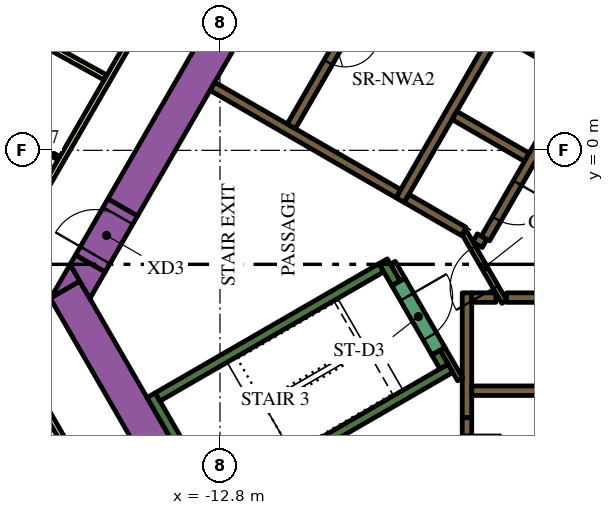
"""IFC4 building model, lengths in metres.
Left out: names, types, materials, properties, quantities, classifications, styles, units other than length and angle.
Written with IfcOpenShell. Run it as: python <this file> out.ifc"""

import sys

from ifc_helpers import new_model, si_unit, direction, frame, frame_2d, origin, place, context, subcontext, project, spatial, polyline, rectangle, outline, extrude, element, fill, save


model = new_model("IFC4")
c1 = context("Model", 3, precision=1e-05, world=origin(), true_north=direction((0.0, 1.0)))
c2 = subcontext(c1, "Body", "Model", "MODEL_VIEW")
j1 = project(units=[si_unit("LENGTHUNIT", "METRE"), si_unit("PLANEANGLEUNIT", "RADIAN")], contexts=[c1])
p1 = place(None, origin())
s1 = spatial("IfcSite", under=j1, at=p1, CompositionType="ELEMENT")
p2 = place(p1, origin())
s2 = spatial("IfcBuilding", under=s1, at=p2, CompositionType="ELEMENT")
p3 = place(p2, frame((0.0, 0.0, 74.4)))
s3 = spatial("IfcBuildingStorey", under=s2, at=p3, CompositionType="ELEMENT", Elevation=74.4)
p4 = place(p3, frame((-15.36, -1.503, 0.0), z_axis=(0.0, 0.0, 1.0), x_axis=(0.50000389221, 0.866023156604, 0.0)))
e1 = element("IfcWall", 1, at=p4, inside=s3, PredefinedType="SOLIDWALL", context=c2, shape_type="SweptSolid", body=[
    extrude(rectangle(XDim=21.0, YDim=0.9, at=frame_2d((10.5, 0.0))), origin(), (0.0, 0.0, 1.0), 3.9),
])
p5 = place(p3, frame((-12.134, -11.883, 0.0), z_axis=(0.0, 0.0, 1.0), x_axis=(-0.500005339912, 0.866022320763, 0.0)))
e2 = element("IfcWall", 2, at=p5, inside=s3, PredefinedType="SOLIDWALL", context=c2, shape_type="SweptSolid", body=[
    extrude(rectangle(XDim=9.488, YDim=0.9, at=frame_2d((4.744, 0.0))), origin(), (0.0, 0.0, 1.0), 3.9),
])
p6 = place(p3, origin())
e3 = element("IfcWall", 3, at=p6, inside=s3, PredefinedType="SOLIDWALL", context=c2, shape_type="SweptSolid", body=[
    extrude(outline(polyline([(-16.489, -3.44), (-17.251, -3.88), (-16.743, -3.0), (-16.489, -3.44)])), origin(), (0.0, 0.0, 1.0), 3.9),
])
e4 = element("IfcWall", 4, at=p6, inside=s3, PredefinedType="SOLIDWALL", context=c2, shape_type="SweptSolid", body=[
    extrude(outline(polyline([(-15.82, -3.201), (-16.223, -3.9), (-16.743, -3.0), (-16.599, -2.751), (-15.82, -3.201)])), origin(), (0.0, 0.0, 1.0), 3.9),
])
p7 = place(p3, frame((-12.885, -9.431, 0.0), z_axis=(0.0, 0.0, 1.0), x_axis=(-0.500020560727, 0.866013532718, 0.0)))
e5 = element("IfcWall", 5, at=p7, inside=s3, PredefinedType="SOLIDWALL", context=c2, shape_type="SweptSolid", body=[
    extrude(rectangle(XDim=3.45, YDim=0.25, at=frame_2d((1.725, 0.0))), origin(), (0.0, 0.0, 1.0), 3.9),
])
p8 = place(p3, frame((-14.44, -6.49, 0.0), z_axis=(0.0, 0.0, 1.0), x_axis=(0.866022966069, 0.500004222222, 0.0)))
e6 = element("IfcWall", 6, at=p8, inside=s3, PredefinedType="SOLIDWALL", context=c2, shape_type="SweptSolid", body=[
    extrude(rectangle(XDim=6.8, YDim=0.25, at=frame_2d((3.4, 0.0))), origin(), (0.0, 0.0, 1.0), 3.9),
])
p9 = place(p3, frame((-8.168, -3.503, 0.0), z_axis=(0.0, 0.0, 1.0), x_axis=(-0.499952099219, 0.866053057547, 0.0)))
e7 = element("IfcWall", 7, at=p9, inside=s3, PredefinedType="SOLIDWALL", context=c2, shape_type="SweptSolid", body=[
    extrude(rectangle(XDim=0.675, YDim=0.25, at=frame_2d((0.337, 0.0))), origin(), (0.0, 0.0, 1.0), 3.9),
])
p10 = place(p3, frame((-12.84, -9.261, 0.0), z_axis=(0.0, 0.0, 1.0), x_axis=(0.866016039709, 0.500016218704, 0.0)))
e8 = element("IfcWall", 8, at=p10, inside=s3, PredefinedType="SOLIDWALL", context=c2, shape_type="SweptSolid", body=[
    extrude(rectangle(XDim=7.05, YDim=0.25, at=frame_2d((3.525, 0.0))), origin(), (0.0, 0.0, 1.0), 3.9),
])
p11 = place(p3, frame((-6.905, -5.69, 0.0), z_axis=(0.0, 0.0, 1.0), x_axis=(-0.500402024738, 0.865793170242, 0.0)))
e9 = element("IfcWall", 9, at=p11, inside=s3, PredefinedType="SOLIDWALL", context=c2, shape_type="SweptSolid", body=[
    extrude(rectangle(XDim=0.425, YDim=0.25, at=frame_2d((0.212, 0.0))), origin(), (0.0, 0.0, 1.0), 3.9),
])
p12 = place(p3, frame((-5.259, -3.875, 0.0), z_axis=(0.0, 0.0, 1.0), x_axis=(1.0, 0.0, 0.0)))
e10 = element("IfcWall", 10, at=p12, inside=s3, PredefinedType="SOLIDWALL", context=c2, shape_type="SweptSolid", body=[
    extrude(rectangle(XDim=10.489, YDim=0.25, at=frame_2d((5.244, 0.0))), origin(), (0.0, 0.0, 1.0), 3.9),
])
p13 = place(p3, frame((-6.3, -7.035, 0.0), z_axis=(0.0, 0.0, 1.0), x_axis=(0.0, 1.0, 0.0)))
e11 = element("IfcWall", 11, at=p13, inside=s3, PredefinedType="SOLIDWALL", context=c2, shape_type="SweptSolid", body=[
    extrude(rectangle(XDim=3.285, YDim=0.25, at=frame_2d((1.643, 0.0))), origin(), (0.0, 0.0, 1.0), 3.9),
])
p14 = place(p3, frame((-6.175, -3.875, 0.0), z_axis=(0.0, 0.0, 1.0), x_axis=(1.0, 0.0, 0.0)))
e12 = element("IfcWall", 12, at=p14, inside=s3, PredefinedType="SOLIDWALL", context=c2, shape_type="SweptSolid", body=[
    extrude(rectangle(XDim=0.637, YDim=0.25, at=frame_2d((0.318, 0.0))), origin(), (0.0, 0.0, 1.0), 3.9),
])
p15 = place(p3, frame((-8.06, -1.311, 0.0), z_axis=(0.0, 0.0, 1.0), x_axis=(0.50000273126, 0.866023826885, 0.0)))
e13 = element("IfcWall", 13, at=p15, inside=s3, PredefinedType="SOLIDWALL", context=c2, shape_type="SweptSolid", body=[
    extrude(rectangle(XDim=10.33, YDim=0.25, at=frame_2d((5.165, 0.0))), origin(), (0.0, 0.0, 1.0), 3.9),
])
for number, where, z_axis, x_axis in (
    (14, (-5.369, 3.1, 0.0), (0.0, 0.0, 1.0), (0.866, -0.5, 0.0)),
    (15, (-4.724, -0.182, 0.0), (0.0, 0.0, 1.0), (-0.866, 0.5, 0.0)),
):
    element("IfcWall", number, at=place(p3, frame(where, z_axis=z_axis, x_axis=x_axis)), inside=s3, PredefinedType="SOLIDWALL", context=c2, shape_type="SweptSolid", body=[
        extrude(rectangle(XDim=2.2, YDim=0.25, at=frame_2d((1.1, 0.0))), origin(), (0.0, 0.0, 1.0), 3.9),
    ])
p16 = place(p3, frame((-6.088, -2.305, 0.0), z_axis=(0.0, 0.0, 1.0), x_axis=(0.866059450854, -0.499941024108, 0.0)))
e16 = element("IfcWall", 16, at=p16, inside=s3, PredefinedType="SOLIDWALL", context=c2, shape_type="SweptSolid", body=[
    extrude(rectangle(XDim=0.29, YDim=0.25, at=frame_2d((0.145, 0.0))), origin(), (0.0, 0.0, 1.0), 3.9),
])
p17 = place(p3, frame((-7.889, -1.265, 0.0), z_axis=(0.0, 0.0, 1.0), x_axis=(0.865986741702, -0.500066958712, 0.0)))
e17 = element("IfcWall", 17, at=p17, inside=s3, PredefinedType="SOLIDWALL", context=c2, shape_type="SweptSolid", body=[
    extrude(rectangle(XDim=1.738, YDim=0.25, at=frame_2d((0.869, 0.0))), origin(), (0.0, 0.0, 1.0), 3.9),
])
p18 = place(p3, frame((-8.106, -1.14, 0.0), z_axis=(0.0, 0.0, 1.0), x_axis=(-0.866000643155, 0.500042884217, 0.0)))
e18 = element("IfcWall", 18, at=p18, inside=s3, PredefinedType="SOLIDWALL", context=c2, shape_type="SweptSolid", body=[
    extrude(rectangle(XDim=5.65, YDim=0.25, at=frame_2d((2.825, 0.0))), origin(), (0.0, 0.0, 1.0), 3.9),
])
p19 = place(p3, frame((-6.48, -6.027, 0.0), z_axis=(0.0, 0.0, 1.0), x_axis=(-0.499927229454, 0.866067413802, 0.0)))
e19 = element("IfcWall", 19, at=p19, inside=s3, PredefinedType="PARTITIONING", context=c2, shape_type="SweptSolid", body=[
    extrude(rectangle(XDim=0.929, YDim=0.15, at=frame_2d((0.464, 0.0))), origin(), (0.0, 0.0, 1.0), 3.9),
])
p20 = place(p3, frame((-8.252, -2.958, 0.0), z_axis=(0.0, 0.0, 1.0), x_axis=(0.500174715838, -0.865924508047, 0.0)))
e20 = element("IfcWall", 20, at=p20, inside=s3, PredefinedType="PARTITIONING", context=c2, shape_type="SweptSolid", body=[
    extrude(rectangle(XDim=0.514, YDim=0.15, at=frame_2d((0.257, 0.0))), origin(), (0.0, 0.0, 1.0), 2.7),
])
p21 = place(p3, frame((-6.175, -6.325, 0.0), z_axis=(0.0, 0.0, 1.0), x_axis=(1.0, 0.0, 0.0)))
e21 = element("IfcWall", 21, at=p21, inside=s3, PredefinedType="SOLIDWALL", context=c2, shape_type="SweptSolid", body=[
    extrude(rectangle(XDim=12.35, YDim=0.25, at=frame_2d((6.175, 0.0))), origin(), (0.0, 0.0, 1.0), 3.9),
])
p22 = place(p21, frame((3.205, 0.0, 0.0)))
e22 = element("IfcOpeningElement", 22, at=p22, cuts=e21, PredefinedType="OPENING", context=c2, shape_type="SweptSolid", body=[
    extrude(rectangle(XDim=0.9, YDim=2.1, at=frame_2d((0.45, 1.05))), frame((0.0, 0.135, 0.0), z_axis=(0.0, -1.0, 0.0), x_axis=(1.0, 0.0, 0.0)), (0.0, 0.0, 1.0), 0.27),
])
p23 = place(p21, frame((8.145, 0.0, 0.0)))
e23 = element("IfcOpeningElement", 23, at=p23, cuts=e21, PredefinedType="OPENING", context=c2, shape_type="SweptSolid", body=[
    extrude(rectangle(XDim=1.1, YDim=2.1, at=frame_2d((0.55, 1.05))), frame((0.0, 0.135, 0.0), z_axis=(0.0, -1.0, 0.0), x_axis=(1.0, 0.0, 0.0)), (0.0, 0.0, 1.0), 0.27),
])
p24 = place(p21, frame((10.665, 0.0, 0.0)))
e24 = element("IfcOpeningElement", 24, at=p24, cuts=e21, PredefinedType="OPENING", context=c2, shape_type="SweptSolid", body=[
    extrude(rectangle(XDim=1.1, YDim=2.1, at=frame_2d((0.55, 1.05))), frame((0.0, 0.135, 0.0), z_axis=(0.0, -1.0, 0.0), x_axis=(1.0, 0.0, 0.0)), (0.0, 0.0, 1.0), 0.27),
])
p25 = place(p3, frame((-6.008, 9.144, 0.0), z_axis=(0.0, 0.0, 1.0), x_axis=(-0.500006956611, -0.866021387346, 0.0)))
e25 = element("IfcWall", 25, at=p25, inside=s3, PredefinedType="SOLIDWALL", context=c2, shape_type="SweptSolid", body=[
    extrude(rectangle(XDim=9.83, YDim=0.25, at=frame_2d((4.915, 0.0))), origin(), (0.0, 0.0, 1.0), 3.9),
])
p26 = place(p25, frame((6.985, 0.0, 0.0)))
e26 = element("IfcOpeningElement", 26, at=p26, cuts=e25, PredefinedType="OPENING", context=c2, shape_type="SweptSolid", body=[
    extrude(rectangle(XDim=0.9, YDim=2.1, at=frame_2d((0.45, 1.05))), frame((0.0, 0.135, 0.0), z_axis=(0.0, -1.0, 0.0), x_axis=(1.0, 0.0, 0.0)), (0.0, 0.0, 1.0), 0.27),
])
p27 = place(p3, frame((-0.898, 6.194, 0.0), z_axis=(0.0, 0.0, 1.0), x_axis=(-0.499996202215, -0.866027596426, 0.0)))
e27 = element("IfcWall", 27, at=p27, inside=s3, PredefinedType="SOLIDWALL", context=c2, shape_type="SweptSolid", body=[
    extrude(rectangle(XDim=9.83, YDim=0.25, at=frame_2d((4.915, 0.0))), origin(), (0.0, 0.0, 1.0), 3.9),
])
p28 = place(p27, frame((0.585, 0.0, 0.0)))
e28 = element("IfcOpeningElement", 28, at=p28, cuts=e27, PredefinedType="OPENING", context=c2, shape_type="SweptSolid", body=[
    extrude(rectangle(XDim=1.1, YDim=2.1, at=frame_2d((0.55, 1.05))), frame((0.0, 0.135, 0.0), z_axis=(0.0, -1.0, 0.0), x_axis=(1.0, 0.0, 0.0)), (0.0, 0.0, 1.0), 0.27),
])
p29 = place(p27, frame((3.105, 0.0, 0.0)))
e29 = element("IfcOpeningElement", 29, at=p29, cuts=e27, PredefinedType="OPENING", context=c2, shape_type="SweptSolid", body=[
    extrude(rectangle(XDim=1.1, YDim=2.1, at=frame_2d((0.55, 1.05))), frame((0.0, 0.135, 0.0), z_axis=(0.0, -1.0, 0.0), x_axis=(1.0, 0.0, 0.0)), (0.0, 0.0, 1.0), 0.27),
])
p30 = place(p27, frame((5.625, 0.0, 0.0)))
e30 = element("IfcOpeningElement", 30, at=p30, cuts=e27, PredefinedType="OPENING", context=c2, shape_type="SweptSolid", body=[
    extrude(rectangle(XDim=1.1, YDim=2.1, at=frame_2d((0.55, 1.05))), frame((0.0, 0.135, 0.0), z_axis=(0.0, -1.0, 0.0), x_axis=(1.0, 0.0, 0.0)), (0.0, 0.0, 1.0), 0.27),
])
p31 = place(p27, frame((8.145, 0.0, 0.0)))
e31 = element("IfcOpeningElement", 31, at=p31, cuts=e27, PredefinedType="OPENING", context=c2, shape_type="SweptSolid", body=[
    extrude(rectangle(XDim=1.1, YDim=2.1, at=frame_2d((0.55, 1.05))), frame((0.0, 0.135, 0.0), z_axis=(0.0, -1.0, 0.0), x_axis=(1.0, 0.0, 0.0)), (0.0, 0.0, 1.0), 0.27),
])
p32 = place(p3, frame((-8.103, -3.466, 0.0), z_axis=(0.0, 0.0, 1.0), x_axis=(0.500078061341, -0.865980330357, 0.0)))
e32 = element("IfcWall", 32, at=p32, inside=s3, PredefinedType="SOLIDWALL", context=c2, shape_type="SweptSolid", body=[
    extrude(rectangle(XDim=2.1, YDim=0.4, at=frame_2d((1.05, 0.0))), origin(), (0.0, 0.0, 1.0), 3.9),
])
p33 = place(p32, frame((0.45, 0.0, 0.0)))
e33 = element("IfcOpeningElement", 33, at=p33, cuts=e32, PredefinedType="OPENING", context=c2, shape_type="SweptSolid", body=[
    extrude(rectangle(XDim=1.2, YDim=2.1, at=frame_2d((0.6, 1.05))), frame((0.0, 0.21, 0.0), z_axis=(0.0, -1.0, 0.0), x_axis=(1.0, 0.0, 0.0)), (0.0, 0.0, 1.0), 0.42),
])
p34 = place(p3, frame((-6.3, -7.035, 0.0), z_axis=(0.0, 0.0, 1.0), x_axis=(0.0, -1.0, 0.0)))
e34 = element("IfcWall", 34, at=p34, inside=s3, PredefinedType="SOLIDWALL", context=c2, shape_type="SweptSolid", body=[
    extrude(rectangle(XDim=1.8, YDim=0.25, at=frame_2d((0.9, 0.0))), origin(), (0.0, 0.0, 1.0), 3.9),
])
p35 = place(p34, frame((0.45, 0.0, 0.0)))
e35 = element("IfcOpeningElement", 35, at=p35, cuts=e34, PredefinedType="OPENING", context=c2, shape_type="SweptSolid", body=[
    extrude(rectangle(XDim=0.9, YDim=2.1, at=frame_2d((0.45, 1.05))), frame((0.0, 0.135, 0.0), z_axis=(0.0, -1.0, 0.0), x_axis=(1.0, 0.0, 0.0)), (0.0, 0.0, 1.0), 0.27),
])
p36 = place(p3, frame((-5.317, -3.99, 0.0), z_axis=(0.0, 0.0, 1.0), x_axis=(-0.500027713859, 0.866009402589, 0.0)))
e36 = element("IfcWall", 36, at=p36, inside=s3, PredefinedType="PARTITIONING", context=c2, shape_type="SweptSolid", body=[
    extrude(rectangle(XDim=2.1, YDim=0.15, at=frame_2d((1.05, 0.0))), origin(), (0.0, 0.0, 1.0), 3.9),
])
p37 = place(p36, frame((0.45, 0.0, 0.0)))
e37 = element("IfcOpeningElement", 37, at=p37, cuts=e36, PredefinedType="OPENING", context=c2, shape_type="SweptSolid", body=[
    extrude(rectangle(XDim=1.2, YDim=2.1, at=frame_2d((0.6, 1.05))), frame((0.0, 0.085, 0.0), z_axis=(0.0, -1.0, 0.0), x_axis=(1.0, 0.0, 0.0)), (0.0, 0.0, 1.0), 0.17),
])
p38 = place(p3, frame((-16.209, -2.976, 0.0), z_axis=(0.0, 0.0, 1.0), x_axis=(0.499954529098, 0.86605165483, 0.0)))
e38 = element("IfcWall", 38, at=p38, inside=s3, PredefinedType="SOLIDWALL", context=c2, shape_type="SweptSolid", body=[
    extrude(rectangle(XDim=1.7, YDim=0.9, at=frame_2d((0.85, 0.0))), origin(), (0.0, 0.0, 1.0), 3.9),
])
p39 = place(p38, frame((0.25, 0.0, 0.0)))
e39 = element("IfcOpeningElement", 39, at=p39, cuts=e38, PredefinedType="OPENING", context=c2, shape_type="SweptSolid", body=[
    extrude(rectangle(XDim=1.2, YDim=2.1, at=frame_2d((0.6, 1.05))), frame((0.0, 0.46, 0.0), z_axis=(0.0, -1.0, 0.0), x_axis=(1.0, 0.0, 0.0)), (0.0, 0.0, 1.0), 0.92),
])
p40 = place(p3, frame((-19.081, -3.9, 0.0), z_axis=(0.0, 0.0, 1.0), x_axis=(0.499998313975, 0.866026377209, 0.0)))
e40 = element("IfcWall", 40, at=p40, inside=s3, PredefinedType="PARTITIONING", context=c2, shape_type="SweptSolid", body=[
    extrude(rectangle(XDim=25.766, YDim=0.15, at=frame_2d((12.883, 0.0))), origin(), (0.0, 0.0, 1.0), 2.7),
])
p41 = place(p40, frame((24.265, 0.0, 0.0)))
e41 = element("IfcOpeningElement", 41, at=p41, cuts=e40, PredefinedType="OPENING", context=c2, shape_type="SweptSolid", body=[
    extrude(rectangle(XDim=1.0, YDim=2.1, at=frame_2d((0.5, 1.05))), frame((0.0, 0.085, 0.0), z_axis=(0.0, -1.0, 0.0), x_axis=(1.0, 0.0, 0.0)), (0.0, 0.0, 1.0), 0.17),
])
p42 = place(p40, frame((13.146, 0.0, 0.0)))
e42 = element("IfcOpeningElement", 42, at=p42, cuts=e40, PredefinedType="OPENING", context=c2, shape_type="SweptSolid", body=[
    extrude(rectangle(XDim=1.1, YDim=2.1, at=frame_2d((0.55, 1.05))), frame((0.0, 0.085, 0.0), z_axis=(0.0, -1.0, 0.0), x_axis=(1.0, 0.0, 0.0)), (0.0, 0.0, 1.0), 0.17),
])
p43 = place(p40, frame((11.693, 0.0, 0.0)))
e43 = element("IfcOpeningElement", 43, at=p43, cuts=e40, PredefinedType="OPENING", context=c2, shape_type="SweptSolid", body=[
    extrude(rectangle(XDim=1.0, YDim=2.1, at=frame_2d((0.5, 1.05))), frame((0.0, 0.085, 0.0), z_axis=(0.0, -1.0, 0.0), x_axis=(1.0, 0.0, 0.0)), (0.0, 0.0, 1.0), 0.17),
])
p44 = place(p40, frame((0.18, 0.0, 0.0)))
e44 = element("IfcOpeningElement", 44, at=p44, cuts=e40, PredefinedType="OPENING", context=c2, shape_type="SweptSolid", body=[
    extrude(rectangle(XDim=1.0, YDim=2.1, at=frame_2d((0.5, 1.05))), frame((0.0, 0.085, 0.0), z_axis=(0.0, -1.0, 0.0), x_axis=(1.0, 0.0, 0.0)), (0.0, 0.0, 1.0), 0.17),
])
p45 = place(p3, frame((-16.412, -8.523, 0.0), z_axis=(0.0, 0.0, 1.0), x_axis=(-0.500001929737, 0.866024289647, 0.0)))
e45 = element("IfcWall", 45, at=p45, inside=s3, PredefinedType="PARTITIONING", context=c2, shape_type="SweptSolid", body=[
    extrude(rectangle(XDim=5.268, YDim=0.15, at=frame_2d((2.634, 0.0))), origin(), (0.0, 0.0, 1.0), 2.7),
])
p46 = place(p3, frame((-27.134, -2.779, 0.0), z_axis=(0.0, 0.0, 1.0), x_axis=(0.8882049501, -0.459447457951, 0.0)))
e46 = element("IfcWall", 46, at=p46, inside=s3, PredefinedType="PARTITIONING", context=c2, shape_type="SweptSolid", body=[
    extrude(rectangle(XDim=11.638, YDim=0.15, at=frame_2d((5.819, 0.0))), origin(), (0.0, 0.0, 1.0), 2.7),
])
p47 = place(p3, frame((-23.132, 5.962, 0.0), z_axis=(0.0, 0.0, 1.0), x_axis=(0.875121716713, -0.483902863121, 0.0)))
e47 = element("IfcWall", 47, at=p47, inside=s3, PredefinedType="PARTITIONING", context=c2, shape_type="SweptSolid", body=[
    extrude(rectangle(XDim=8.355, YDim=0.15, at=frame_2d((4.178, 0.0))), origin(), (0.0, 0.0, 1.0), 2.7),
])
p48 = place(p3, frame((-19.463, 1.19, 0.0), z_axis=(0.0, 0.0, 1.0), x_axis=(0.866034573852, -0.49998411664, 0.0)))
e48 = element("IfcWall", 48, at=p48, inside=s3, PredefinedType="PARTITIONING", context=c2, shape_type="SweptSolid", body=[
    extrude(rectangle(XDim=2.8, YDim=0.1, at=frame_2d((1.4, 0.0))), origin(), (0.0, 0.0, 1.0), 2.7),
])
p49 = place(p48, frame((1.3, 0.0, 0.0)))
e49 = element("IfcOpeningElement", 49, at=p49, cuts=e48, PredefinedType="OPENING", context=c2, shape_type="SweptSolid", body=[
    extrude(rectangle(XDim=0.9, YDim=2.1, at=frame_2d((0.45, 1.05))), frame((0.0, 0.06, 0.0), z_axis=(0.0, -1.0, 0.0), x_axis=(1.0, 0.0, 0.0)), (0.0, 0.0, 1.0), 0.12),
])
p50 = place(p26, origin())
e50 = element("IfcDoor", 50, at=p50, inside=s3, OperationType="SINGLE_SWING_LEFT", PredefinedType="DOOR", context=c2, shape_type="SweptSolid", body=[
    extrude(rectangle(XDim=0.9, YDim=2.1, at=frame_2d((0.45, 1.05))), frame((0.0, 0.025, 0.0), z_axis=(0.0, -1.0, 0.0), x_axis=(1.0, 0.0, 0.0)), (0.0, 0.0, 1.0), 0.05),
])
fill(e26, e50)
p51 = place(p31, origin())
e51 = element("IfcDoor", 51, at=p51, inside=s3, OperationType="DOUBLE_DOOR_SLIDING", PredefinedType="DOOR", context=c2, shape_type="SweptSolid", body=[
    extrude(rectangle(XDim=1.1, YDim=2.1, at=frame_2d((0.55, 1.05))), frame((0.0, 0.025, 0.0), z_axis=(0.0, -1.0, 0.0), x_axis=(1.0, 0.0, 0.0)), (0.0, 0.0, 1.0), 0.05),
])
fill(e31, e51)
p52 = place(p33, origin())
e52 = element("IfcDoor", 52, at=p52, inside=s3, OperationType="SINGLE_SWING_LEFT", PredefinedType="DOOR", context=c2, shape_type="SweptSolid", body=[
    extrude(rectangle(XDim=1.2, YDim=2.1, at=frame_2d((0.6, 1.05))), frame((0.0, 0.025, 0.0), z_axis=(0.0, -1.0, 0.0), x_axis=(1.0, 0.0, 0.0)), (0.0, 0.0, 1.0), 0.05),
])
fill(e33, e52)
p53 = place(p35, origin())
e53 = element("IfcDoor", 53, at=p53, inside=s3, OperationType="SINGLE_SWING_LEFT", PredefinedType="DOOR", context=c2, shape_type="SweptSolid", body=[
    extrude(rectangle(XDim=0.9, YDim=2.1, at=frame_2d((0.45, 1.05))), frame((0.0, 0.025, 0.0), z_axis=(0.0, -1.0, 0.0), x_axis=(1.0, 0.0, 0.0)), (0.0, 0.0, 1.0), 0.05),
])
fill(e35, e53)
p54 = place(p37, origin())
e54 = element("IfcDoor", 54, at=p54, inside=s3, OperationType="SINGLE_SWING_LEFT", PredefinedType="DOOR", context=c2, shape_type="SweptSolid", body=[
    extrude(rectangle(XDim=1.2, YDim=2.1, at=frame_2d((0.6, 1.05))), frame((0.0, 0.025, 0.0), z_axis=(0.0, -1.0, 0.0), x_axis=(1.0, 0.0, 0.0)), (0.0, 0.0, 1.0), 0.05),
])
fill(e37, e54)
p55 = place(p39, origin())
e55 = element("IfcDoor", 55, at=p55, inside=s3, OperationType="SINGLE_SWING_LEFT", PredefinedType="DOOR", context=c2, shape_type="SweptSolid", body=[
    extrude(rectangle(XDim=1.2, YDim=2.1, at=frame_2d((0.6, 1.05))), frame((0.0, 0.025, 0.0), z_axis=(0.0, -1.0, 0.0), x_axis=(1.0, 0.0, 0.0)), (0.0, 0.0, 1.0), 0.05),
])
fill(e39, e55)
save(model, sys.argv[1])
